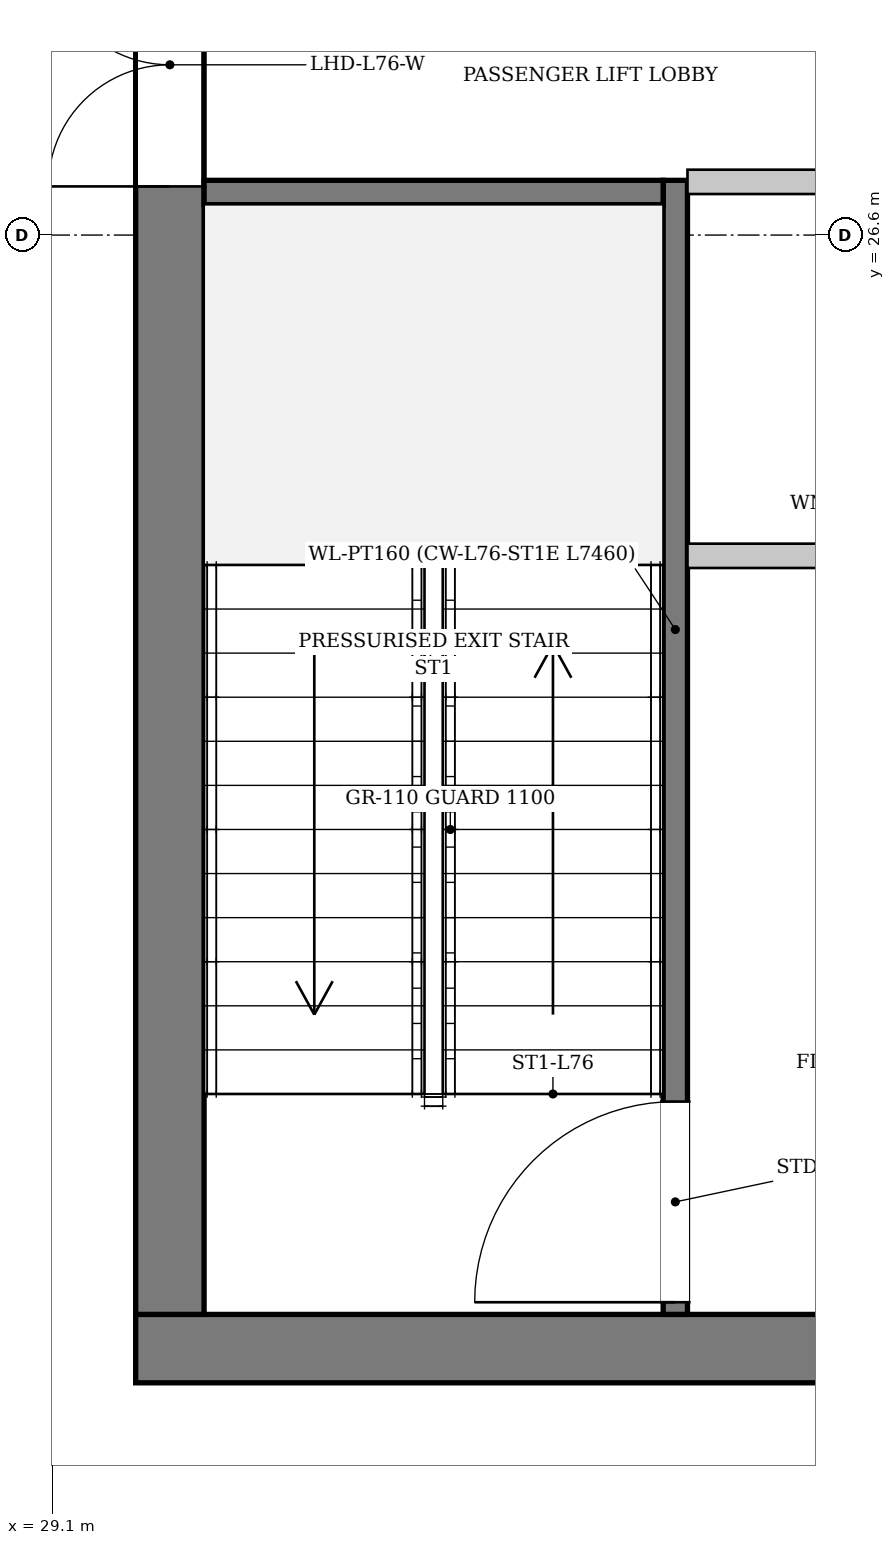
"""IFC4 building model, lengths in metres.
Left out: names, types, materials, properties, quantities, classifications, styles, units other than length and angle.
Written with IfcOpenShell. Run it as: python <this file> out.ifc"""

import sys

from ifc_helpers import new_model, si_unit, direction, frame, frame_2d, origin, place, context, subcontext, project, spatial, rectangle, extrude, source, transform, mapped, element, fill, save


model = new_model("IFC4")
c1 = context("Model", 3, precision=1e-05, world=origin(), true_north=direction((0.0, 1.0)))
c2 = subcontext(c1, "Body", "Model", "MODEL_VIEW")
j1 = project(units=[si_unit("LENGTHUNIT", "METRE"), si_unit("PLANEANGLEUNIT", "RADIAN")], contexts=[c1])
p1 = place(None, origin())
s1 = spatial("IfcSite", under=j1, at=p1, CompositionType="ELEMENT")
p2 = place(p1, origin())
s2 = spatial("IfcBuilding", under=s1, at=p2, CompositionType="ELEMENT")
p3 = place(p2, frame((0.0, 0.0, 286.1)))
s3 = spatial("IfcBuildingStorey", under=s2, at=p3, CompositionType="ELEMENT", Elevation=286.1)
p4 = place(p3, frame((30.61, 12.974, 0.0), z_axis=(0.0, 0.0, 1.0), x_axis=(-0.818470582771, 0.57454843585, 0.0)))
e1 = element("IfcWall", 1, at=p4, inside=s3, PredefinedType="SOLIDWALL", context=c2, shape_type="SweptSolid", body=[
    extrude(rectangle(XDim=17.145, YDim=0.32, at=frame_2d((8.573, 0.0))), origin(), (0.0, 0.0, 1.0), 3.662),
])
p5 = place(p4, frame((4.737, 0.0, 0.0)))
e2 = element("IfcOpeningElement", 2, at=p5, cuts=e1, PredefinedType="OPENING", context=c2, shape_type="SweptSolid", body=[
    extrude(rectangle(XDim=1.5, YDim=2.3, at=frame_2d((0.75, 1.15))), frame((0.0, 0.17, 0.0), z_axis=(0.0, -1.0, 0.0), x_axis=(1.0, 0.0, 0.0)), (0.0, 0.0, 1.0), 0.34),
])
p6 = place(p4, frame((11.388, 0.0, 0.65)))
e3 = element("IfcOpeningElement", 3, at=p6, cuts=e1, PredefinedType="OPENING", context=c2, shape_type="SweptSolid", body=[
    extrude(rectangle(XDim=2.6, YDim=2.35, at=frame_2d((1.3, 1.175))), frame((0.0, 0.17, 0.0), z_axis=(0.0, -1.0, 0.0), x_axis=(1.0, 0.0, 0.0)), (0.0, 0.0, 1.0), 0.34),
])
p7 = place(p3, frame((46.35, 19.275, 0.0), z_axis=(0.0, 0.0, 1.0), x_axis=(-1.0, 0.0, 0.0)))
e4 = element("IfcWall", 4, at=p7, inside=s3, PredefinedType="SHEAR", context=c2, shape_type="SweptSolid", body=[
    extrude(rectangle(XDim=16.7, YDim=0.45, at=frame_2d((8.35, 0.0))), origin(), (0.0, 0.0, 1.0), 4.12),
])
p8 = place(p7, frame((4.55, 0.0, 0.0)))
e5 = element("IfcOpeningElement", 5, at=p8, cuts=e4, PredefinedType="OPENING", context=c2, shape_type="SweptSolid", body=[
    extrude(rectangle(XDim=1.12, YDim=2.25, at=frame_2d((0.56, 1.125))), frame((0.0, 0.235, 0.0), z_axis=(0.0, -1.0, 0.0), x_axis=(1.0, 0.0, 0.0)), (0.0, 0.0, 1.0), 0.47),
])
p9 = place(p7, frame((11.05, 0.0, 0.0)))
e6 = element("IfcOpeningElement", 6, at=p9, cuts=e4, PredefinedType="OPENING", context=c2, shape_type="SweptSolid", body=[
    extrude(rectangle(XDim=1.12, YDim=2.25, at=frame_2d((0.56, 1.125))), frame((0.0, 0.235, 0.0), z_axis=(0.0, -1.0, 0.0), x_axis=(1.0, 0.0, 0.0)), (0.0, 0.0, 1.0), 0.47),
])
p10 = place(p3, frame((29.875, 19.5, 0.0), z_axis=(0.0, 0.0, 1.0), x_axis=(0.0, 1.0, 0.0)))
e7 = element("IfcWall", 7, at=p10, inside=s3, PredefinedType="SHEAR", context=c2, shape_type="SweptSolid", body=[
    extrude(rectangle(XDim=14.2, YDim=0.45, at=frame_2d((7.1, 0.0))), origin(), (0.0, 0.0, 1.0), 4.12),
])
p11 = place(p10, frame((7.42, 0.0, 0.0)))
e8 = element("IfcOpeningElement", 8, at=p11, cuts=e7, PredefinedType="OPENING", context=c2, shape_type="SweptSolid", body=[
    extrude(rectangle(XDim=1.6, YDim=2.2, at=frame_2d((0.8, 1.1))), frame((0.0, 0.235, 0.0), z_axis=(0.0, -1.0, 0.0), x_axis=(1.0, 0.0, 0.0)), (0.0, 0.0, 1.0), 0.47),
])
p12 = place(p3, frame((33.2, 19.5, 0.0), z_axis=(0.0, 0.0, 1.0), x_axis=(0.0, 1.0, 0.0)))
e9 = element("IfcWall", 9, at=p12, inside=s3, PredefinedType="PARTITIONING", context=c2, shape_type="SweptSolid", body=[
    extrude(rectangle(XDim=7.46, YDim=0.16, at=frame_2d((3.73, 0.0))), origin(), (0.0, 0.0, 1.0), 4.12),
])
p13 = place(p12, frame((0.08, 0.0, 0.0)))
e10 = element("IfcOpeningElement", 10, at=p13, cuts=e9, PredefinedType="OPENING", context=c2, shape_type="SweptSolid", body=[
    extrude(rectangle(XDim=1.32, YDim=2.2, at=frame_2d((0.66, 1.1))), frame((0.0, 0.09, 0.0), z_axis=(0.0, -1.0, 0.0), x_axis=(1.0, 0.0, 0.0)), (0.0, 0.0, 1.0), 0.18),
])
p14 = place(p3, frame((30.1, 26.88, 0.0), z_axis=(0.0, 0.0, 1.0), x_axis=(1.0, 0.0, 0.0)))
e11 = element("IfcWall", 11, at=p14, inside=s3, PredefinedType="PARTITIONING", context=c2, shape_type="SweptSolid", body=[
    extrude(rectangle(XDim=3.02, YDim=0.16, at=frame_2d((1.51, 0.0))), origin(), (0.0, 0.0, 1.0), 4.12),
])
p15 = place(p3, frame((33.28, 24.49, 0.0), z_axis=(0.0, 0.0, 1.0), x_axis=(1.0, 0.0, 0.0)))
e12 = element("IfcWall", 12, at=p15, inside=s3, PredefinedType="PARTITIONING", context=c2, shape_type="SweptSolid", body=[
    extrude(rectangle(XDim=9.44, YDim=0.16, at=frame_2d((4.72, 0.0))), origin(), (0.0, 0.0, 1.0), 4.12),
])
p16 = place(p15, frame((0.85, 0.0, 0.95)))
e13 = element("IfcOpeningElement", 13, at=p16, cuts=e12, PredefinedType="OPENING", context=c2, shape_type="SweptSolid", body=[
    extrude(rectangle(XDim=1.4, YDim=1.8, at=frame_2d((0.7, 0.9))), frame((0.0, 0.09, 0.0), z_axis=(0.0, -1.0, 0.0), x_axis=(1.0, 0.0, 0.0)), (0.0, 0.0, 1.0), 0.18),
])
p17 = place(p3, frame((33.28, 26.95, 0.0), z_axis=(0.0, 0.0, 1.0), x_axis=(1.0, 0.0, 0.0)))
e14 = element("IfcWall", 14, at=p17, inside=s3, PredefinedType="PARTITIONING", context=c2, shape_type="SweptSolid", body=[
    extrude(rectangle(XDim=9.44, YDim=0.16, at=frame_2d((4.72, 0.0))), origin(), (0.0, 0.0, 1.0), 4.12),
])
p18 = place(p17, frame((1.2, 0.0, 0.0)))
e15 = element("IfcOpeningElement", 15, at=p18, cuts=e14, PredefinedType="OPENING", context=c2, shape_type="SweptSolid", body=[
    extrude(rectangle(XDim=0.95, YDim=2.1, at=frame_2d((0.475, 1.05))), frame((0.0, 0.09, 0.0), z_axis=(0.0, -1.0, 0.0), x_axis=(1.0, 0.0, 0.0)), (0.0, 0.0, 1.0), 0.18),
])
p19 = place(p17, frame((4.65, 0.0, 0.0)))
e16 = element("IfcOpeningElement", 16, at=p19, cuts=e14, PredefinedType="OPENING", context=c2, shape_type="SweptSolid", body=[
    extrude(rectangle(XDim=0.95, YDim=2.1, at=frame_2d((0.475, 1.05))), frame((0.0, 0.09, 0.0), z_axis=(0.0, -1.0, 0.0), x_axis=(1.0, 0.0, 0.0)), (0.0, 0.0, 1.0), 0.18),
])
p20 = place(p17, frame((7.745, 0.0, 0.0)))
e17 = element("IfcOpeningElement", 17, at=p20, cuts=e14, PredefinedType="OPENING", context=c2, shape_type="SweptSolid", body=[
    extrude(rectangle(XDim=0.95, YDim=2.1, at=frame_2d((0.475, 1.05))), frame((0.0, 0.09, 0.0), z_axis=(0.0, -1.0, 0.0), x_axis=(1.0, 0.0, 0.0)), (0.0, 0.0, 1.0), 0.18),
])
m1 = source(origin(), c2, "Body", "SweptSolid", [
    extrude(rectangle(XDim=1.6, YDim=2.2, at=frame_2d((0.8, 1.1))), frame((0.0, 0.025, 0.0), z_axis=(0.0, -1.0, 0.0), x_axis=(1.0, 0.0, 0.0)), (0.0, 0.0, 1.0), 0.05),
])
p21 = place(p11, origin())
e18 = element("IfcDoor", 18, at=p21, inside=s3, OperationType="DOUBLE_DOOR_SINGLE_SWING", PredefinedType="DOOR", context=c2, shape_type="MappedRepresentation", body=[
    mapped(m1, transform((0.0, 0.0, 0.0), x_axis=(1.0, 0.0, 0.0), y_axis=(0.0, 1.0, 0.0), z_axis=(0.0, 0.0, 1.0), scale=1.0)),
])
fill(e8, e18)
m2 = source(origin(), c2, "Body", "SweptSolid", [
    extrude(rectangle(XDim=1.32, YDim=2.2, at=frame_2d((0.66, 1.1))), frame((0.0, 0.025, 0.0), z_axis=(0.0, -1.0, 0.0), x_axis=(1.0, 0.0, 0.0)), (0.0, 0.0, 1.0), 0.05),
])
p22 = place(p13, origin())
e19 = element("IfcDoor", 19, at=p22, inside=s3, OperationType="SINGLE_SWING_LEFT", PredefinedType="DOOR", context=c2, shape_type="MappedRepresentation", body=[
    mapped(m2, transform((0.0, 0.0, 0.0), x_axis=(1.0, 0.0, 0.0), y_axis=(0.0, 1.0, 0.0), z_axis=(0.0, 0.0, 1.0), scale=1.0)),
])
fill(e10, e19)
save(model, sys.argv[1])
